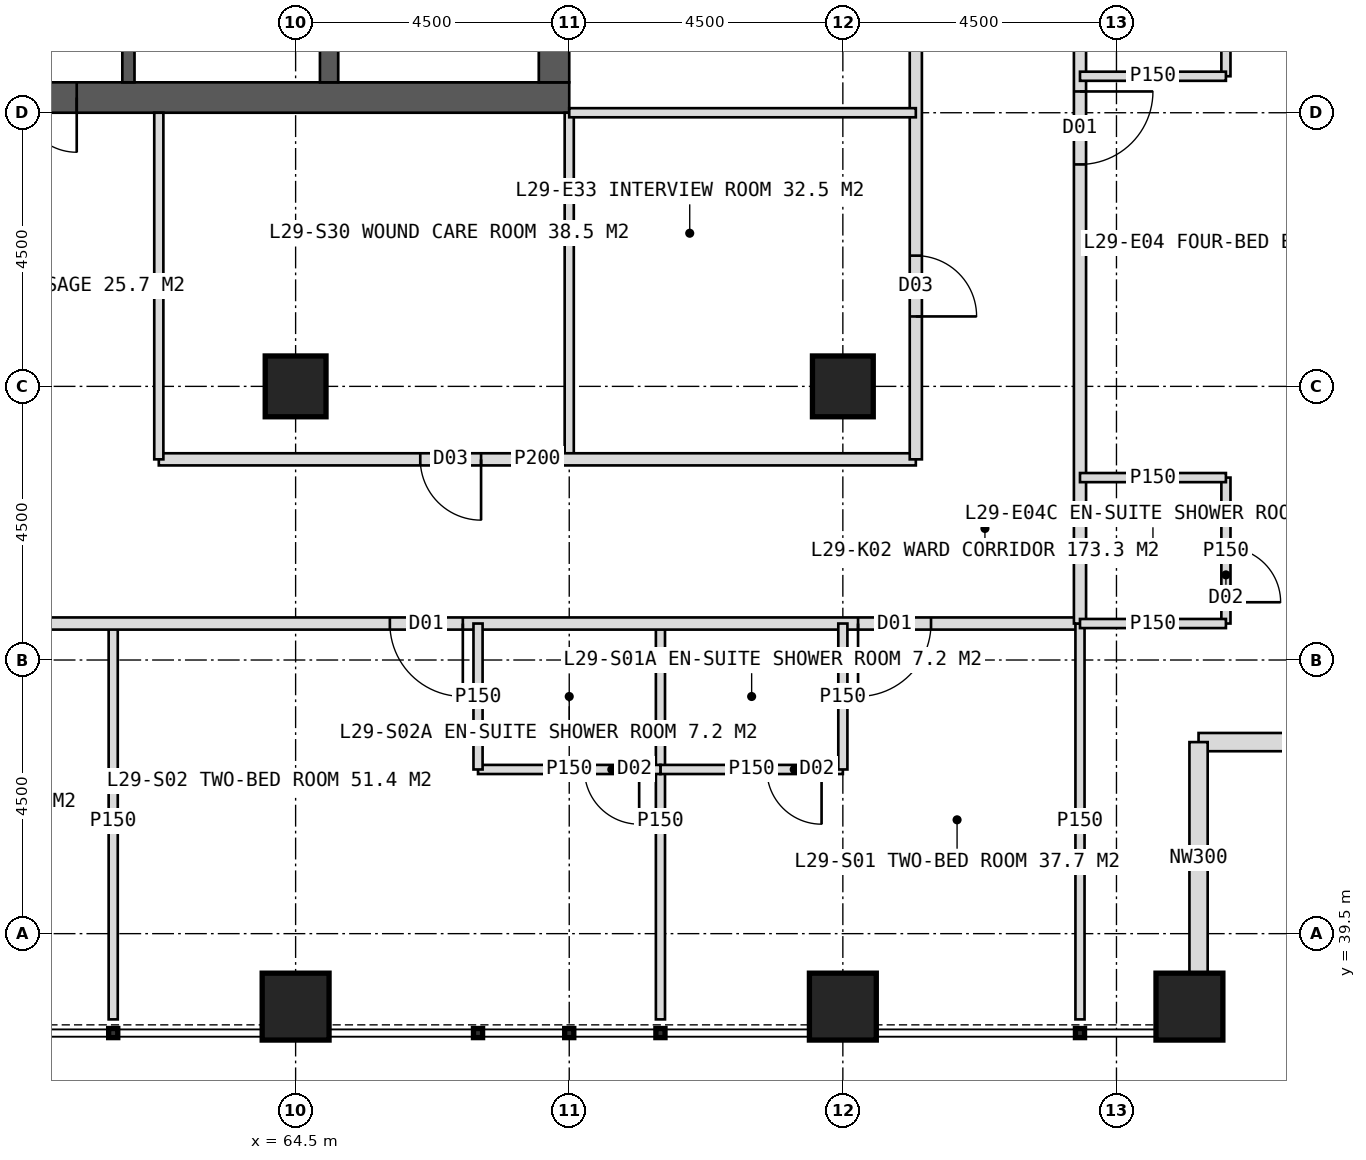
"""IFC4 building model, lengths in metres.
Left out: names, types, materials, properties, quantities, classifications, styles, units other than length and angle.
Written with IfcOpenShell. Run it as: python <this file> out.ifc"""

import sys

from ifc_helpers import new_model, si_unit, direction, frame, frame_2d, origin, origin_2d, place, context, subcontext, project, spatial, rectangle, hollow_rectangle, extrude, element, fill, save


model = new_model("IFC4")
c1 = context("Model", 3, precision=1e-05, world=origin(), true_north=direction((0.0, 1.0)))
c2 = subcontext(c1, "Body", "Model", "MODEL_VIEW")
j1 = project(units=[si_unit("LENGTHUNIT", "METRE"), si_unit("PLANEANGLEUNIT", "RADIAN")], contexts=[c1])
p1 = place(None, origin())
s1 = spatial("IfcSite", under=j1, at=p1, CompositionType="ELEMENT")
p2 = place(p1, origin())
s2 = spatial("IfcBuilding", under=s1, at=p2, CompositionType="ELEMENT")
p3 = place(p2, frame((0.0, 0.0, 124.0)))
s3 = spatial("IfcBuildingStorey", under=s2, at=p3, CompositionType="ELEMENT", Elevation=124.0)
p4 = place(p3, frame((51.0, 53.25, 0.0), z_axis=(0.0, 0.0, 1.0), x_axis=(1.0, 0.0, 0.0)))
e1 = element("IfcWall", 1, at=p4, inside=s3, PredefinedType="SHEAR", context=c2, shape_type="SweptSolid", body=[
    extrude(rectangle(XDim=18.0, YDim=0.5, at=frame_2d((9.0, 0.0))), origin(), (0.0, 0.0, 1.0), 4.0),
])
p5 = place(p4, frame((8.1, 0.0, 0.0)))
e2 = element("IfcOpeningElement", 2, at=p5, cuts=e1, PredefinedType="OPENING", context=c2, shape_type="SweptSolid", body=[
    extrude(rectangle(XDim=1.8, YDim=2.2, at=frame_2d((0.9, 1.1))), frame((0.0, 0.26, 0.0), z_axis=(0.0, -1.0, 0.0), x_axis=(1.0, 0.0, 0.0)), (0.0, 0.0, 1.0), 0.52),
])
p6 = place(p3, frame((68.75, 53.5, 0.0), z_axis=(0.0, 0.0, 1.0), x_axis=(0.0, 1.0, 0.0)))
e3 = element("IfcWall", 3, at=p6, inside=s3, PredefinedType="SHEAR", context=c2, shape_type="SweptSolid", body=[
    extrude(rectangle(XDim=17.0, YDim=0.5, at=frame_2d((8.5, 0.0))), origin(), (0.0, 0.0, 1.0), 4.0),
])
p7 = place(p6, frame((9.5, 0.0, 0.0)))
e4 = element("IfcOpeningElement", 4, at=p7, cuts=e3, PredefinedType="OPENING", context=c2, shape_type="SweptSolid", body=[
    extrude(rectangle(XDim=1.5, YDim=2.2, at=frame_2d((0.75, 1.1))), frame((0.0, 0.26, 0.0), z_axis=(0.0, -1.0, 0.0), x_axis=(1.0, 0.0, 0.0)), (0.0, 0.0, 1.0), 0.52),
])
p8 = place(p3, frame((65.05, 53.5, 0.0), z_axis=(0.0, 0.0, 1.0), x_axis=(0.0, 1.0, 0.0)))
e5 = element("IfcWall", 5, at=p8, inside=s3, PredefinedType="SHEAR", context=c2, shape_type="SweptSolid", body=[
    extrude(rectangle(XDim=17.0, YDim=0.3, at=frame_2d((8.5, 0.0))), origin(), (0.0, 0.0, 1.0), 4.0),
])
p9 = place(p3, frame((61.75, 53.5, 0.0), z_axis=(0.0, 0.0, 1.0), x_axis=(0.0, 1.0, 0.0)))
e6 = element("IfcWall", 6, at=p9, inside=s3, PredefinedType="SHEAR", context=c2, shape_type="SweptSolid", body=[
    extrude(rectangle(XDim=17.0, YDim=0.2, at=frame_2d((8.5, 0.0))), origin(), (0.0, 0.0, 1.0), 4.0),
])
p10 = place(p9, frame((1.375, 0.0, 0.0)))
e7 = element("IfcOpeningElement", 7, at=p10, cuts=e6, PredefinedType="OPENING", context=c2, shape_type="SweptSolid", body=[
    extrude(rectangle(XDim=1.4, YDim=2.2, at=frame_2d((0.7, 1.1))), frame((0.0, 0.11, 0.0), z_axis=(0.0, -1.0, 0.0), x_axis=(1.0, 0.0, 0.0)), (0.0, 0.0, 1.0), 0.22),
])
p11 = place(p9, frame((5.675, 0.0, 0.0)))
e8 = element("IfcOpeningElement", 8, at=p11, cuts=e6, PredefinedType="OPENING", context=c2, shape_type="SweptSolid", body=[
    extrude(rectangle(XDim=1.4, YDim=2.2, at=frame_2d((0.7, 1.1))), frame((0.0, 0.11, 0.0), z_axis=(0.0, -1.0, 0.0), x_axis=(1.0, 0.0, 0.0)), (0.0, 0.0, 1.0), 0.22),
])
for number, where, z_axis, x_axis in (
    (9, (73.5, 48.5, 0.0), (0.0, 0.0, 1.0), (1.0, 0.0, 0.0)),
    (10, (64.5, 48.5, 0.0), (0.0, 0.0, 1.0), (1.0, 0.0, 0.0)),
):
    element("IfcColumn", number, at=place(p3, frame(where, z_axis=z_axis, x_axis=x_axis)), inside=s3, PredefinedType="COLUMN", context=c2, shape_type="SweptSolid", body=[
        extrude(hollow_rectangle(XDim=1.0, YDim=1.0, WallThickness=0.1, at=origin_2d()), origin(), (0.0, 0.0, 1.0), 4.0),
    ])
for number, where, z_axis, x_axis in (
    (11, (64.5, 38.3, 0.0), (0.0, 0.0, 1.0), (1.0, 0.0, 0.0)),
    (12, (73.5, 38.3, 0.0), (0.0, 0.0, 1.0), (1.0, 0.0, 0.0)),
    (13, (79.2, 38.3, 0.0), (0.0, 0.0, 1.0), (1.0, 0.0, 0.0)),
):
    element("IfcColumn", number, at=place(p3, frame(where, z_axis=z_axis, x_axis=x_axis)), inside=s3, PredefinedType="COLUMN", context=c2, shape_type="SweptSolid", body=[
        extrude(hollow_rectangle(XDim=1.1, YDim=1.1, WallThickness=0.1, at=origin_2d()), origin(), (0.0, 0.0, 1.0), 4.0),
    ])
for number, where, z_axis, x_axis in (
    (14, (83.15, 42.65, 0.0), (0.0, 0.0, 1.0), (-1.0, 0.0, 0.0)),
    (15, (79.35, 42.65, 0.0), (0.0, 0.0, 1.0), (0.0, -1.0, 0.0)),
):
    element("IfcWall", number, at=place(p3, frame(where, z_axis=z_axis, x_axis=x_axis)), inside=s3, PredefinedType="ELEMENTEDWALL", context=c2, shape_type="SweptSolid", body=[
        extrude(rectangle(XDim=3.8, YDim=0.3, at=frame_2d((1.9, 0.0))), origin(), (0.0, 0.0, 1.0), 4.0),
    ])
for number, where, z_axis, x_axis in (
    (16, (70.5, 44.6, 0.0), (0.0, 0.0, 1.0), (0.0, -1.0, 0.0)),
    (17, (61.5, 44.6, 0.0), (0.0, 0.0, 1.0), (0.0, -1.0, 0.0)),
):
    element("IfcWall", number, at=place(p3, frame(where, z_axis=z_axis, x_axis=x_axis)), inside=s3, PredefinedType="PARTITIONING", context=c2, shape_type="SweptSolid", body=[
        extrude(rectangle(XDim=6.51, YDim=0.15, at=frame_2d((3.255, 0.0))), origin(), (0.0, 0.0, 1.0), 3.75),
    ])
p12 = place(p3, frame((77.4, 44.6, 0.0), z_axis=(0.0, 0.0, 1.0), x_axis=(-1.0, 0.0, 0.0)))
e18 = element("IfcWall", 18, at=p12, inside=s3, PredefinedType="PARTITIONING", context=c2, shape_type="SweptSolid", body=[
    extrude(rectangle(XDim=34.8, YDim=0.2, at=frame_2d((17.4, 0.0))), origin(), (0.0, 0.0, 1.0), 3.75),
])
p13 = place(p12, frame((2.45, 0.0, 0.0)))
e19 = element("IfcOpeningElement", 19, at=p13, cuts=e18, PredefinedType="OPENING", context=c2, shape_type="SweptSolid", body=[
    extrude(rectangle(XDim=1.2, YDim=2.2, at=frame_2d((0.6, 1.1))), frame((0.0, 0.11, 0.0), z_axis=(0.0, -1.0, 0.0), x_axis=(1.0, 0.0, 0.0)), (0.0, 0.0, 1.0), 0.22),
])
p14 = place(p12, frame((10.15, 0.0, 0.0)))
e20 = element("IfcOpeningElement", 20, at=p14, cuts=e18, PredefinedType="OPENING", context=c2, shape_type="SweptSolid", body=[
    extrude(rectangle(XDim=1.2, YDim=2.2, at=frame_2d((0.6, 1.1))), frame((0.0, 0.11, 0.0), z_axis=(0.0, -1.0, 0.0), x_axis=(1.0, 0.0, 0.0)), (0.0, 0.0, 1.0), 0.22),
])
p15 = place(p12, frame((20.45, 0.0, 0.0)))
e21 = element("IfcOpeningElement", 21, at=p15, cuts=e18, PredefinedType="OPENING", context=c2, shape_type="SweptSolid", body=[
    extrude(rectangle(XDim=1.2, YDim=2.2, at=frame_2d((0.6, 1.1))), frame((0.0, 0.11, 0.0), z_axis=(0.0, -1.0, 0.0), x_axis=(1.0, 0.0, 0.0)), (0.0, 0.0, 1.0), 0.22),
])
p16 = place(p12, frame((27.55, 0.0, 0.0)))
e22 = element("IfcOpeningElement", 22, at=p16, cuts=e18, PredefinedType="OPENING", context=c2, shape_type="SweptSolid", body=[
    extrude(rectangle(XDim=1.2, YDim=2.2, at=frame_2d((0.6, 1.1))), frame((0.0, 0.11, 0.0), z_axis=(0.0, -1.0, 0.0), x_axis=(1.0, 0.0, 0.0)), (0.0, 0.0, 1.0), 0.22),
])
p17 = place(p3, frame((77.4, 44.6, 0.0), z_axis=(0.0, 0.0, 1.0), x_axis=(0.0, -1.0, 0.0)))
e23 = element("IfcWall", 23, at=p17, inside=s3, PredefinedType="PARTITIONING", context=c2, shape_type="SweptSolid", body=[
    extrude(rectangle(XDim=6.51, YDim=0.15, at=frame_2d((3.255, 0.0))), origin(), (0.0, 0.0, 1.0), 3.75),
])
p18 = place(p3, frame((73.5, 42.2, 0.0), z_axis=(0.0, 0.0, 1.0), x_axis=(-1.0, 0.0, 0.0)))
e24 = element("IfcWall", 24, at=p18, inside=s3, PredefinedType="PARTITIONING", context=c2, shape_type="SweptSolid", body=[
    extrude(rectangle(XDim=3.0, YDim=0.15, at=frame_2d((1.5, 0.0))), origin(), (0.0, 0.0, 1.0), 3.75),
])
p19 = place(p18, frame((0.35, 0.0, 0.0)))
e25 = element("IfcOpeningElement", 25, at=p19, cuts=e24, PredefinedType="OPENING", context=c2, shape_type="SweptSolid", body=[
    extrude(rectangle(XDim=0.9, YDim=2.1, at=frame_2d((0.45, 1.05))), frame((0.0, 0.085, 0.0), z_axis=(0.0, -1.0, 0.0), x_axis=(1.0, 0.0, 0.0)), (0.0, 0.0, 1.0), 0.17),
])
p20 = place(p3, frame((73.5, 44.6, 0.0), z_axis=(0.0, 0.0, 1.0), x_axis=(0.0, -1.0, 0.0)))
e26 = element("IfcWall", 26, at=p20, inside=s3, PredefinedType="PARTITIONING", context=c2, shape_type="SweptSolid", body=[
    extrude(rectangle(XDim=2.4, YDim=0.15, at=frame_2d((1.2, 0.0))), origin(), (0.0, 0.0, 1.0), 2.95),
])
p21 = place(p3, frame((70.5, 42.2, 0.0), z_axis=(0.0, 0.0, 1.0), x_axis=(-1.0, 0.0, 0.0)))
e27 = element("IfcWall", 27, at=p21, inside=s3, PredefinedType="PARTITIONING", context=c2, shape_type="SweptSolid", body=[
    extrude(rectangle(XDim=3.0, YDim=0.15, at=frame_2d((1.5, 0.0))), origin(), (0.0, 0.0, 1.0), 3.75),
])
p22 = place(p21, frame((0.35, 0.0, 0.0)))
e28 = element("IfcOpeningElement", 28, at=p22, cuts=e27, PredefinedType="OPENING", context=c2, shape_type="SweptSolid", body=[
    extrude(rectangle(XDim=0.9, YDim=2.1, at=frame_2d((0.45, 1.05))), frame((0.0, 0.085, 0.0), z_axis=(0.0, -1.0, 0.0), x_axis=(1.0, 0.0, 0.0)), (0.0, 0.0, 1.0), 0.17),
])
p23 = place(p3, frame((67.5, 44.6, 0.0), z_axis=(0.0, 0.0, 1.0), x_axis=(0.0, -1.0, 0.0)))
e29 = element("IfcWall", 29, at=p23, inside=s3, PredefinedType="PARTITIONING", context=c2, shape_type="SweptSolid", body=[
    extrude(rectangle(XDim=2.4, YDim=0.15, at=frame_2d((1.2, 0.0))), origin(), (0.0, 0.0, 1.0), 3.75),
])
p24 = place(p3, frame((69.0, 53.0, 0.0), z_axis=(0.0, 0.0, 1.0), x_axis=(0.0, -1.0, 0.0)))
e30 = element("IfcWall", 30, at=p24, inside=s3, PredefinedType="PARTITIONING", context=c2, shape_type="SweptSolid", body=[
    extrude(rectangle(XDim=5.7, YDim=0.15, at=frame_2d((2.85, 0.0))), origin(), (0.0, 0.0, 1.0), 3.75),
])
p25 = place(p3, frame((74.7, 47.3, 0.0), z_axis=(0.0, 0.0, 1.0), x_axis=(-1.0, 0.0, 0.0)))
e31 = element("IfcWall", 31, at=p25, inside=s3, PredefinedType="PARTITIONING", context=c2, shape_type="SweptSolid", body=[
    extrude(rectangle(XDim=12.45, YDim=0.2, at=frame_2d((6.225, 0.0))), origin(), (0.0, 0.0, 1.0), 3.75),
])
p26 = place(p25, frame((7.15, 0.0, 0.0)))
e32 = element("IfcOpeningElement", 32, at=p26, cuts=e31, PredefinedType="OPENING", context=c2, shape_type="SweptSolid", body=[
    extrude(rectangle(XDim=1.0, YDim=2.1, at=frame_2d((0.5, 1.05))), frame((0.0, 0.11, 0.0), z_axis=(0.0, -1.0, 0.0), x_axis=(1.0, 0.0, 0.0)), (0.0, 0.0, 1.0), 0.22),
])
p27 = place(p3, frame((62.25, 53.0, 0.0), z_axis=(0.0, 0.0, 1.0), x_axis=(0.0, -1.0, 0.0)))
e33 = element("IfcWall", 33, at=p27, inside=s3, PredefinedType="PARTITIONING", context=c2, shape_type="SweptSolid", body=[
    extrude(rectangle(XDim=5.7, YDim=0.15, at=frame_2d((2.85, 0.0))), origin(), (0.0, 0.0, 1.0), 3.75),
])
p28 = place(p3, frame((77.4, 79.4, 0.0), z_axis=(0.0, 0.0, 1.0), x_axis=(0.0, -1.0, 0.0)))
e34 = element("IfcWall", 34, at=p28, inside=s3, PredefinedType="PARTITIONING", context=c2, shape_type="SweptSolid", body=[
    extrude(rectangle(XDim=34.8, YDim=0.2, at=frame_2d((17.4, 0.0))), origin(), (0.0, 0.0, 1.0), 3.75),
])
p29 = place(p28, frame((2.45, 0.0, 0.0)))
e35 = element("IfcOpeningElement", 35, at=p29, cuts=e34, PredefinedType="OPENING", context=c2, shape_type="SweptSolid", body=[
    extrude(rectangle(XDim=1.2, YDim=2.2, at=frame_2d((0.6, 1.1))), frame((0.0, 0.11, 0.0), z_axis=(0.0, -1.0, 0.0), x_axis=(1.0, 0.0, 0.0)), (0.0, 0.0, 1.0), 0.22),
])
p30 = place(p28, frame((10.15, 0.0, 0.0)))
e36 = element("IfcOpeningElement", 36, at=p30, cuts=e34, PredefinedType="OPENING", context=c2, shape_type="SweptSolid", body=[
    extrude(rectangle(XDim=1.2, YDim=2.2, at=frame_2d((0.6, 1.1))), frame((0.0, 0.11, 0.0), z_axis=(0.0, -1.0, 0.0), x_axis=(1.0, 0.0, 0.0)), (0.0, 0.0, 1.0), 0.22),
])
p31 = place(p28, frame((19.55, 0.0, 0.0)))
e37 = element("IfcOpeningElement", 37, at=p31, cuts=e34, PredefinedType="OPENING", context=c2, shape_type="SweptSolid", body=[
    extrude(rectangle(XDim=1.2, YDim=2.2, at=frame_2d((0.6, 1.1))), frame((0.0, 0.11, 0.0), z_axis=(0.0, -1.0, 0.0), x_axis=(1.0, 0.0, 0.0)), (0.0, 0.0, 1.0), 0.22),
])
p32 = place(p28, frame((26.05, 0.0, 0.0)))
e38 = element("IfcOpeningElement", 38, at=p32, cuts=e34, PredefinedType="OPENING", context=c2, shape_type="SweptSolid", body=[
    extrude(rectangle(XDim=1.2, YDim=2.2, at=frame_2d((0.6, 1.1))), frame((0.0, 0.11, 0.0), z_axis=(0.0, -1.0, 0.0), x_axis=(1.0, 0.0, 0.0)), (0.0, 0.0, 1.0), 0.22),
])
p33 = place(p3, frame((79.8, 56.0, 0.0), z_axis=(0.0, 0.0, 1.0), x_axis=(0.0, -1.0, 0.0)))
e39 = element("IfcWall", 39, at=p33, inside=s3, PredefinedType="PARTITIONING", context=c2, shape_type="SweptSolid", body=[
    extrude(rectangle(XDim=2.4, YDim=0.15, at=frame_2d((1.2, 0.0))), origin(), (0.0, 0.0, 1.0), 3.75),
])
p34 = place(p33, frame((0.35, 0.0, 0.0)))
e40 = element("IfcOpeningElement", 40, at=p34, cuts=e39, PredefinedType="OPENING", context=c2, shape_type="SweptSolid", body=[
    extrude(rectangle(XDim=0.9, YDim=2.1, at=frame_2d((0.45, 1.05))), frame((0.0, 0.085, 0.0), z_axis=(0.0, -1.0, 0.0), x_axis=(1.0, 0.0, 0.0)), (0.0, 0.0, 1.0), 0.17),
])
p35 = place(p3, frame((77.4, 53.6, 0.0), z_axis=(0.0, 0.0, 1.0), x_axis=(1.0, 0.0, 0.0)))
e41 = element("IfcWall", 41, at=p35, inside=s3, PredefinedType="PARTITIONING", context=c2, shape_type="SweptSolid", body=[
    extrude(rectangle(XDim=2.4, YDim=0.15, at=frame_2d((1.2, 0.0))), origin(), (0.0, 0.0, 1.0), 3.75),
])
p36 = place(p3, frame((79.8, 47.0, 0.0), z_axis=(0.0, 0.0, 1.0), x_axis=(0.0, -1.0, 0.0)))
e42 = element("IfcWall", 42, at=p36, inside=s3, PredefinedType="PARTITIONING", context=c2, shape_type="SweptSolid", body=[
    extrude(rectangle(XDim=2.4, YDim=0.15, at=frame_2d((1.2, 0.0))), origin(), (0.0, 0.0, 1.0), 3.75),
])
p37 = place(p36, frame((1.15, 0.0, 0.0)))
e43 = element("IfcOpeningElement", 43, at=p37, cuts=e42, PredefinedType="OPENING", context=c2, shape_type="SweptSolid", body=[
    extrude(rectangle(XDim=0.9, YDim=2.1, at=frame_2d((0.45, 1.05))), frame((0.0, 0.085, 0.0), z_axis=(0.0, -1.0, 0.0), x_axis=(1.0, 0.0, 0.0)), (0.0, 0.0, 1.0), 0.17),
])
for number, where, z_axis, x_axis in (
    (44, (77.4, 47.0, 0.0), (0.0, 0.0, 1.0), (1.0, 0.0, 0.0)),
    (45, (77.4, 44.6, 0.0), (0.0, 0.0, 1.0), (1.0, 0.0, 0.0)),
):
    element("IfcWall", number, at=place(p3, frame(where, z_axis=z_axis, x_axis=x_axis)), inside=s3, PredefinedType="PARTITIONING", context=c2, shape_type="SweptSolid", body=[
        extrude(rectangle(XDim=2.4, YDim=0.15, at=frame_2d((1.2, 0.0))), origin(), (0.0, 0.0, 1.0), 3.75),
    ])
p38 = place(p3, frame((74.7, 62.0, 0.0), z_axis=(0.0, 0.0, 1.0), x_axis=(0.0, -1.0, 0.0)))
e46 = element("IfcWall", 46, at=p38, inside=s3, PredefinedType="PARTITIONING", context=c2, shape_type="SweptSolid", body=[
    extrude(rectangle(XDim=14.7, YDim=0.2, at=frame_2d((7.35, 0.0))), origin(), (0.0, 0.0, 1.0), 3.75),
])
p39 = place(p38, frame((1.45, 0.0, 0.0)))
e47 = element("IfcOpeningElement", 47, at=p39, cuts=e46, PredefinedType="OPENING", context=c2, shape_type="SweptSolid", body=[
    extrude(rectangle(XDim=1.0, YDim=2.1, at=frame_2d((0.5, 1.05))), frame((0.0, 0.11, 0.0), z_axis=(0.0, -1.0, 0.0), x_axis=(1.0, 0.0, 0.0)), (0.0, 0.0, 1.0), 0.22),
])
p40 = place(p38, frame((11.35, 0.0, 0.0)))
e48 = element("IfcOpeningElement", 48, at=p40, cuts=e46, PredefinedType="OPENING", context=c2, shape_type="SweptSolid", body=[
    extrude(rectangle(XDim=1.0, YDim=2.1, at=frame_2d((0.5, 1.05))), frame((0.0, 0.11, 0.0), z_axis=(0.0, -1.0, 0.0), x_axis=(1.0, 0.0, 0.0)), (0.0, 0.0, 1.0), 0.22),
])
p41 = place(p3, frame((69.0, 53.0, 0.0), z_axis=(0.0, 0.0, 1.0), x_axis=(1.0, 0.0, 0.0)))
e49 = element("IfcWall", 49, at=p41, inside=s3, PredefinedType="PARTITIONING", context=c2, shape_type="SweptSolid", body=[
    extrude(rectangle(XDim=5.7, YDim=0.15, at=frame_2d((2.85, 0.0))), origin(), (0.0, 0.0, 1.0), 3.75),
])
p42 = place(p13, origin())
e50 = element("IfcDoor", 50, at=p42, inside=s3, OperationType="SINGLE_SWING_RIGHT", PredefinedType="DOOR", context=c2, shape_type="SweptSolid", body=[
    extrude(rectangle(XDim=1.2, YDim=2.2, at=frame_2d((0.6, 1.1))), frame((0.0, 0.025, 0.0), z_axis=(0.0, -1.0, 0.0), x_axis=(1.0, 0.0, 0.0)), (0.0, 0.0, 1.0), 0.05),
])
fill(e19, e50)
p43 = place(p19, origin())
e51 = element("IfcDoor", 51, at=p43, inside=s3, OperationType="SINGLE_SWING_LEFT", PredefinedType="DOOR", context=c2, shape_type="SweptSolid", body=[
    extrude(rectangle(XDim=0.9, YDim=2.1, at=frame_2d((0.45, 1.05))), frame((0.0, 0.025, 0.0), z_axis=(0.0, -1.0, 0.0), x_axis=(1.0, 0.0, 0.0)), (0.0, 0.0, 1.0), 0.05),
])
fill(e25, e51)
p44 = place(p14, origin())
e52 = element("IfcDoor", 52, at=p44, inside=s3, OperationType="SINGLE_SWING_LEFT", PredefinedType="DOOR", context=c2, shape_type="SweptSolid", body=[
    extrude(rectangle(XDim=1.2, YDim=2.2, at=frame_2d((0.6, 1.1))), frame((0.0, 0.025, 0.0), z_axis=(0.0, -1.0, 0.0), x_axis=(1.0, 0.0, 0.0)), (0.0, 0.0, 1.0), 0.05),
])
fill(e20, e52)
p45 = place(p22, origin())
e53 = element("IfcDoor", 53, at=p45, inside=s3, OperationType="SINGLE_SWING_LEFT", PredefinedType="DOOR", context=c2, shape_type="SweptSolid", body=[
    extrude(rectangle(XDim=0.9, YDim=2.1, at=frame_2d((0.45, 1.05))), frame((0.0, 0.025, 0.0), z_axis=(0.0, -1.0, 0.0), x_axis=(1.0, 0.0, 0.0)), (0.0, 0.0, 1.0), 0.05),
])
fill(e28, e53)
p46 = place(p26, origin())
e54 = element("IfcDoor", 54, at=p46, inside=s3, OperationType="SINGLE_SWING_LEFT", PredefinedType="DOOR", context=c2, shape_type="SweptSolid", body=[
    extrude(rectangle(XDim=1.0, YDim=2.1, at=frame_2d((0.5, 1.05))), frame((0.0, 0.025, 0.0), z_axis=(0.0, -1.0, 0.0), x_axis=(1.0, 0.0, 0.0)), (0.0, 0.0, 1.0), 0.05),
])
fill(e32, e54)
p47 = place(p32, origin())
e55 = element("IfcDoor", 55, at=p47, inside=s3, OperationType="SINGLE_SWING_LEFT", PredefinedType="DOOR", context=c2, shape_type="SweptSolid", body=[
    extrude(rectangle(XDim=1.2, YDim=2.2, at=frame_2d((0.6, 1.1))), frame((0.0, 0.025, 0.0), z_axis=(0.0, -1.0, 0.0), x_axis=(1.0, 0.0, 0.0)), (0.0, 0.0, 1.0), 0.05),
])
fill(e38, e55)
p48 = place(p37, origin())
e56 = element("IfcDoor", 56, at=p48, inside=s3, OperationType="SINGLE_SWING_RIGHT", PredefinedType="DOOR", context=c2, shape_type="SweptSolid", body=[
    extrude(rectangle(XDim=0.9, YDim=2.1, at=frame_2d((0.45, 1.05))), frame((0.0, 0.025, 0.0), z_axis=(0.0, -1.0, 0.0), x_axis=(1.0, 0.0, 0.0)), (0.0, 0.0, 1.0), 0.05),
])
fill(e43, e56)
p49 = place(p40, origin())
e57 = element("IfcDoor", 57, at=p49, inside=s3, OperationType="SINGLE_SWING_RIGHT", PredefinedType="DOOR", context=c2, shape_type="SweptSolid", body=[
    extrude(rectangle(XDim=1.0, YDim=2.1, at=frame_2d((0.5, 1.05))), frame((0.0, 0.025, 0.0), z_axis=(0.0, -1.0, 0.0), x_axis=(1.0, 0.0, 0.0)), (0.0, 0.0, 1.0), 0.05),
])
fill(e48, e57)
p50 = place(p5, origin())
e58 = element("IfcDoor", 58, at=p50, inside=s3, OperationType="DOUBLE_DOOR_SINGLE_SWING", PredefinedType="DOOR", context=c2, shape_type="SweptSolid", body=[
    extrude(rectangle(XDim=1.8, YDim=2.2, at=frame_2d((0.9, 1.1))), frame((0.0, 0.025, 0.0), z_axis=(0.0, -1.0, 0.0), x_axis=(1.0, 0.0, 0.0)), (0.0, 0.0, 1.0), 0.05),
])
fill(e2, e58)
save(model, sys.argv[1])
